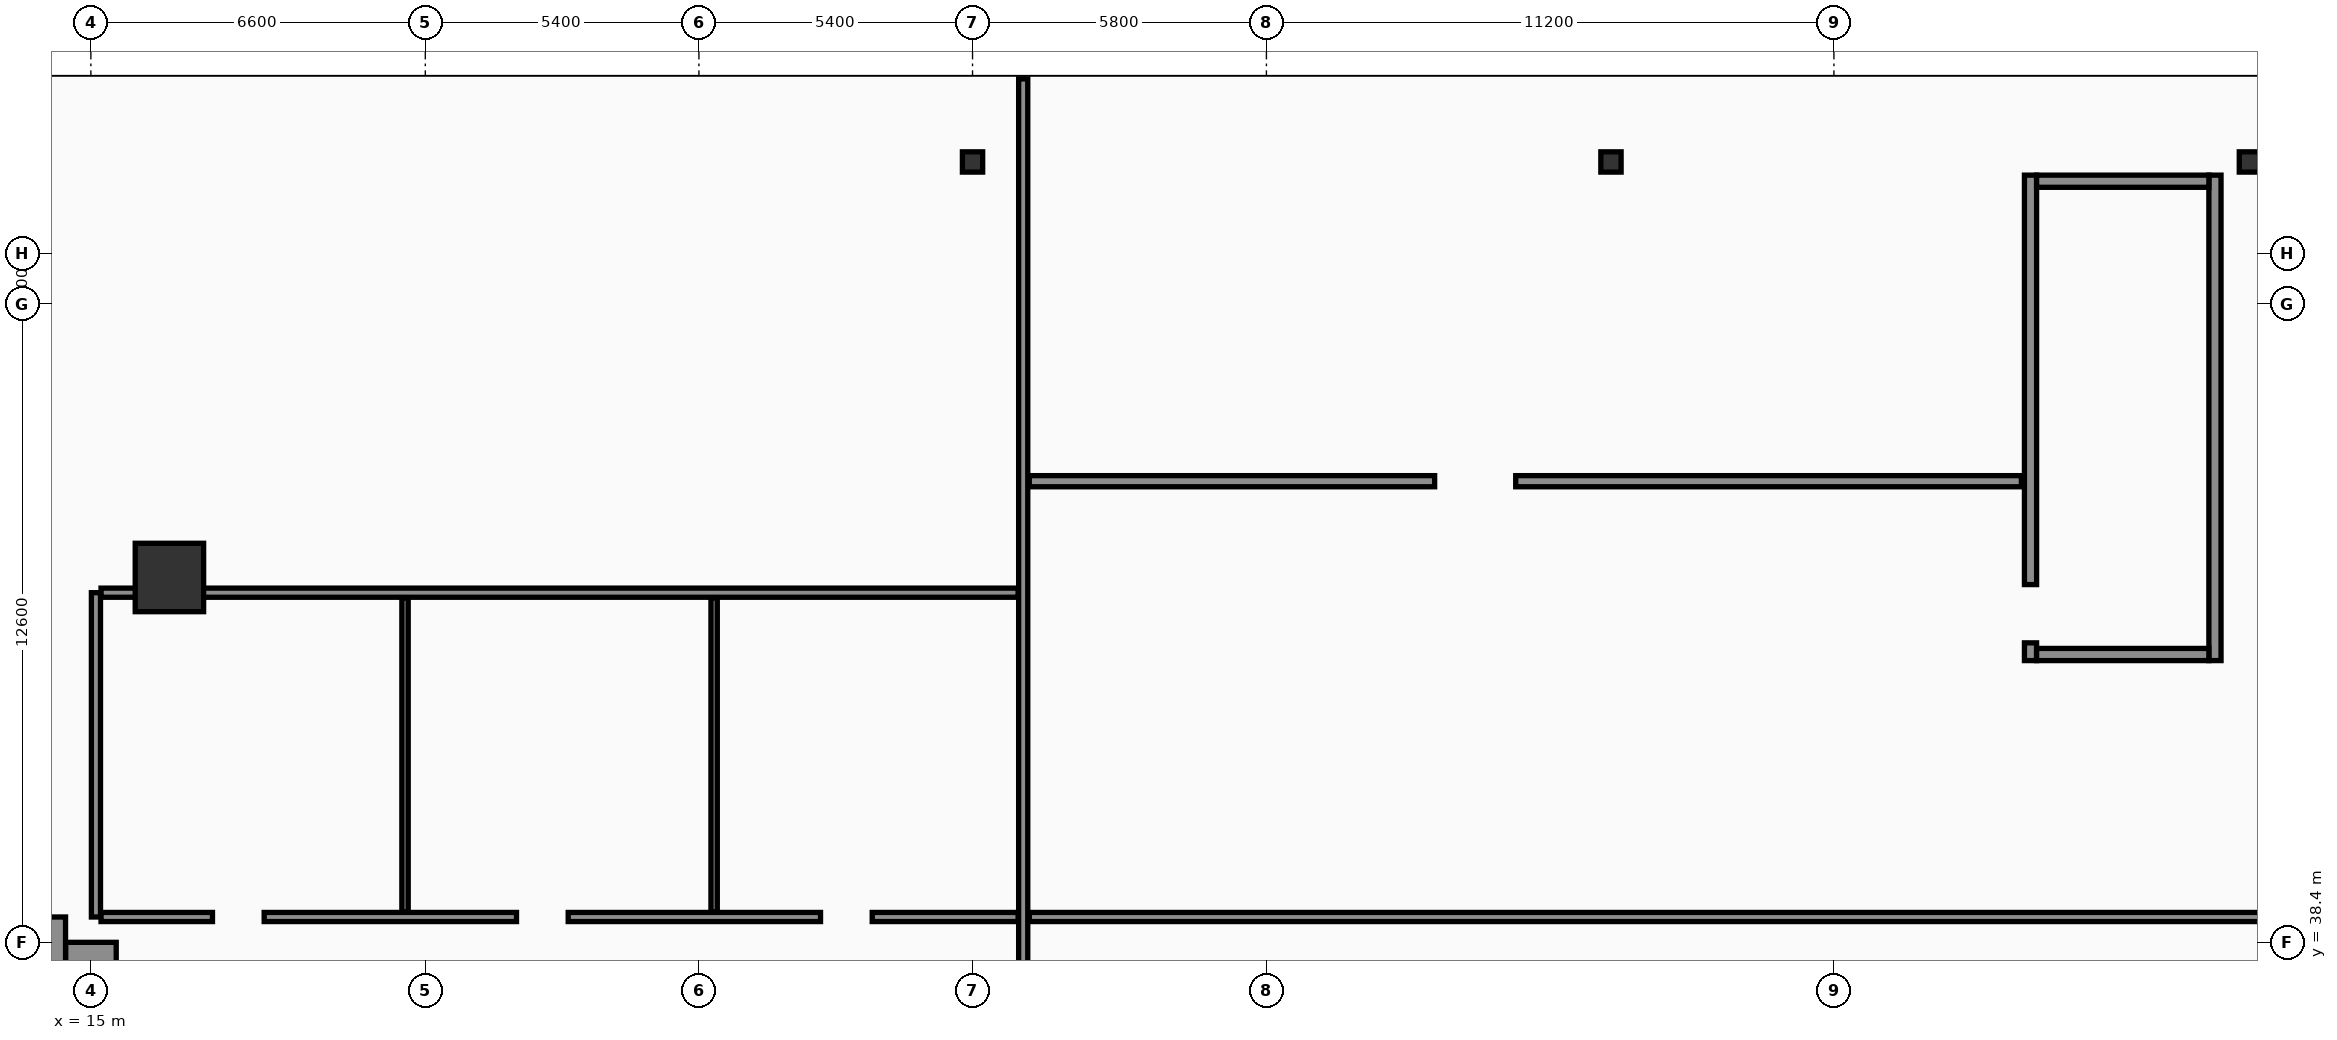
"""IFC4 building model, lengths in metres.
Left out: names, types, materials, properties, quantities, classifications, styles, units other than length and angle.
Written with IfcOpenShell. Run it as: python <this file> out.ifc"""

import sys

from ifc_helpers import new_model, si_unit, direction, frame, frame_2d, origin, origin_2d, place, context, subcontext, project, spatial, rectangle, i_section, extrude, element, fill, save


model = new_model("IFC4")
c1 = context("Model", 3, precision=1e-05, world=origin(), true_north=direction((0.0, 1.0)))
c2 = subcontext(c1, "Body", "Model", "MODEL_VIEW")
j1 = project(units=[si_unit("LENGTHUNIT", "METRE"), si_unit("PLANEANGLEUNIT", "RADIAN")], contexts=[c1])
p1 = place(None, origin())
s1 = spatial("IfcSite", under=j1, at=p1, CompositionType="ELEMENT")
p2 = place(p1, origin())
s2 = spatial("IfcBuilding", under=s1, at=p2, CompositionType="ELEMENT")
p3 = place(p2, frame((0.0, 0.0, 17.0)))
s3 = spatial("IfcBuildingStorey", under=s2, at=p3, CompositionType="ELEMENT", Elevation=17.0)
p4 = place(p3, frame((15.0, 16.8, 0.0), z_axis=(0.0, 0.0, 1.0), x_axis=(0.0, 1.0, 0.0)))
e1 = element("IfcWall", 1, at=p4, inside=s3, PredefinedType="SHEAR", context=c2, shape_type="SweptSolid", body=[
    extrude(rectangle(XDim=21.6, YDim=1.0, at=frame_2d((10.8, 0.0))), origin(), (0.0, 0.0, 1.0), 4.55),
])
p5 = place(p4, frame((8.65, 0.0, 0.0)))
e2 = element("IfcOpeningElement", 2, at=p5, cuts=e1, PredefinedType="OPENING", context=c2, shape_type="SweptSolid", body=[
    extrude(rectangle(XDim=1.1, YDim=2.2, at=frame_2d((0.55, 1.1))), frame((0.0, 0.51, 0.0), z_axis=(0.0, -1.0, 0.0), x_axis=(1.0, 0.0, 0.0)), (0.0, 0.0, 1.0), 1.02),
])
p6 = place(p4, frame((1.25, 0.0, 0.0)))
e3 = element("IfcOpeningElement", 3, at=p6, cuts=e1, PredefinedType="OPENING", context=c2, shape_type="SweptSolid", body=[
    extrude(rectangle(XDim=1.1, YDim=2.2, at=frame_2d((0.55, 1.1))), frame((0.0, 0.51, 0.0), z_axis=(0.0, -1.0, 0.0), x_axis=(1.0, 0.0, 0.0)), (0.0, 0.0, 1.0), 1.02),
])
p7 = place(p4, frame((3.8, 0.0, 0.0)))
e4 = element("IfcOpeningElement", 4, at=p7, cuts=e1, PredefinedType="OPENING", context=c2, shape_type="SweptSolid", body=[
    extrude(rectangle(XDim=1.1, YDim=2.2, at=frame_2d((0.55, 1.1))), frame((0.0, 0.51, 0.0), z_axis=(0.0, -1.0, 0.0), x_axis=(1.0, 0.0, 0.0)), (0.0, 0.0, 1.0), 1.02),
])
p8 = place(p4, frame((6.35, 0.0, 0.0)))
e5 = element("IfcOpeningElement", 5, at=p8, cuts=e1, PredefinedType="OPENING", context=c2, shape_type="SweptSolid", body=[
    extrude(rectangle(XDim=1.1, YDim=2.2, at=frame_2d((0.55, 1.1))), frame((0.0, 0.51, 0.0), z_axis=(0.0, -1.0, 0.0), x_axis=(1.0, 0.0, 0.0)), (0.0, 0.0, 1.0), 1.02),
])
p9 = place(p3, frame((4.7, 38.4, 0.0), z_axis=(0.0, 0.0, 1.0), x_axis=(1.0, 0.0, 0.0)))
e6 = element("IfcWall", 6, at=p9, inside=s3, PredefinedType="SHEAR", context=c2, shape_type="SweptSolid", body=[
    extrude(rectangle(XDim=9.8, YDim=1.0, at=frame_2d((4.9, 0.0))), origin(), (0.0, 0.0, 1.0), 4.55),
])
p10 = place(p3, frame((53.28, 43.96, 0.0), z_axis=(0.0, 0.0, 1.0), x_axis=(0.0, 1.0, 0.0)))
e7 = element("IfcWall", 7, at=p10, inside=s3, PredefinedType="SOLIDWALL", context=c2, shape_type="SweptSolid", body=[
    extrude(rectangle(XDim=9.58, YDim=0.24, at=frame_2d((4.79, 0.0))), origin(), (0.0, 0.0, 1.0), 4.55),
])
p11 = place(p10, frame((0.35, 0.0, 0.0)))
e8 = element("IfcOpeningElement", 8, at=p11, cuts=e7, PredefinedType="OPENING", context=c2, shape_type="SweptSolid", body=[
    extrude(rectangle(XDim=1.15, YDim=2.2, at=frame_2d((0.575, 1.1))), frame((0.0, 0.13, 0.0), z_axis=(0.0, -1.0, 0.0), x_axis=(1.0, 0.0, 0.0)), (0.0, 0.0, 1.0), 0.26),
])
p12 = place(p3, frame((56.92, 43.96, 0.0), z_axis=(0.0, 0.0, 1.0), x_axis=(0.0, 1.0, 0.0)))
e9 = element("IfcWall", 9, at=p12, inside=s3, PredefinedType="SOLIDWALL", context=c2, shape_type="SweptSolid", body=[
    extrude(rectangle(XDim=9.58, YDim=0.24, at=frame_2d((4.79, 0.0))), origin(), (0.0, 0.0, 1.0), 4.55),
])
for number, where, z_axis, x_axis in (
    (10, (53.4, 44.08, 0.0), (0.0, 0.0, 1.0), (1.0, 0.0, 0.0)),
    (11, (53.4, 53.42, 0.0), (0.0, 0.0, 1.0), (1.0, 0.0, 0.0)),
):
    element("IfcWall", number, at=place(p3, frame(where, z_axis=z_axis, x_axis=x_axis)), inside=s3, PredefinedType="SOLIDWALL", context=c2, shape_type="SweptSolid", body=[
        extrude(rectangle(XDim=3.4, YDim=0.24, at=frame_2d((1.7, 0.0))), origin(), (0.0, 0.0, 1.0), 4.55),
    ])
p13 = place(p3, frame((16.55, 45.6, 0.0), z_axis=(0.0, 0.0, 1.0), x_axis=(1.0, 0.0, 0.0)))
e12 = element("IfcColumn", 12, at=p13, inside=s3, PredefinedType="COLUMN", context=c2, shape_type="SweptSolid", body=[
    extrude(rectangle(XDim=1.35, YDim=1.35, at=origin_2d()), origin(), (0.0, 0.0, 1.0), 4.55),
])
for number, where, z_axis, x_axis in (
    (13, (32.4, 53.8, 0.0), (0.0, 0.0, 1.0), (1.0, 0.0, 0.0)),
    (14, (45.0, 53.8, 0.0), (0.0, 0.0, 1.0), (1.0, 0.0, 0.0)),
    (15, (57.6, 53.8, 0.0), (0.0, 0.0, 1.0), (1.0, 0.0, 0.0)),
):
    element("IfcColumn", number, at=place(p3, frame(where, z_axis=z_axis, x_axis=x_axis)), inside=s3, PredefinedType="PILASTER", context=c2, shape_type="SweptSolid", body=[
        extrude(i_section(OverallWidth=0.4, OverallDepth=0.4, WebThickness=0.013, FlangeThickness=0.021, FilletRadius=0.022, at=origin_2d()), origin(), (0.0, 0.0, 1.0), 4.55),
    ])
p14 = place(p3, frame((15.2, 38.9, 0.0), z_axis=(0.0, 0.0, 1.0), x_axis=(1.0, 0.0, 0.0)))
e16 = element("IfcWall", 16, at=p14, inside=s3, PredefinedType="PARTITIONING", context=c2, shape_type="SweptSolid", body=[
    extrude(rectangle(XDim=18.1, YDim=0.18, at=frame_2d((9.05, 0.0))), origin(), (0.0, 0.0, 1.0), 3.75),
])
p15 = place(p14, frame((2.2, 0.0, 0.0)))
e17 = element("IfcOpeningElement", 17, at=p15, cuts=e16, PredefinedType="OPENING", context=c2, shape_type="SweptSolid", body=[
    extrude(rectangle(XDim=1.02, YDim=2.2, at=frame_2d((0.51, 1.1))), frame((0.0, 0.1, 0.0), z_axis=(0.0, -1.0, 0.0), x_axis=(1.0, 0.0, 0.0)), (0.0, 0.0, 1.0), 0.2),
])
p16 = place(p14, frame((8.2, 0.0, 0.0)))
e18 = element("IfcOpeningElement", 18, at=p16, cuts=e16, PredefinedType="OPENING", context=c2, shape_type="SweptSolid", body=[
    extrude(rectangle(XDim=1.02, YDim=2.2, at=frame_2d((0.51, 1.1))), frame((0.0, 0.1, 0.0), z_axis=(0.0, -1.0, 0.0), x_axis=(1.0, 0.0, 0.0)), (0.0, 0.0, 1.0), 0.2),
])
p17 = place(p14, frame((14.2, 0.0, 0.0)))
e19 = element("IfcOpeningElement", 19, at=p17, cuts=e16, PredefinedType="OPENING", context=c2, shape_type="SweptSolid", body=[
    extrude(rectangle(XDim=1.02, YDim=2.2, at=frame_2d((0.51, 1.1))), frame((0.0, 0.1, 0.0), z_axis=(0.0, -1.0, 0.0), x_axis=(1.0, 0.0, 0.0)), (0.0, 0.0, 1.0), 0.2),
])
p18 = place(p3, frame((15.2, 45.3, 0.0), z_axis=(0.0, 0.0, 1.0), x_axis=(1.0, 0.0, 0.0)))
e20 = element("IfcWall", 20, at=p18, inside=s3, PredefinedType="PARTITIONING", context=c2, shape_type="SweptSolid", body=[
    extrude(rectangle(XDim=18.1, YDim=0.18, at=frame_2d((9.05, 0.0))), origin(), (0.0, 0.0, 1.0), 3.75),
])
p19 = place(p3, frame((15.1, 38.9, 0.0), z_axis=(0.0, 0.0, 1.0), x_axis=(0.0, 1.0, 0.0)))
e21 = element("IfcWall", 21, at=p19, inside=s3, PredefinedType="PARTITIONING", context=c2, shape_type="SweptSolid", body=[
    extrude(rectangle(XDim=6.4, YDim=0.18, at=frame_2d((3.2, 0.0))), origin(), (0.0, 0.0, 1.0), 3.75),
])
p20 = place(p3, frame((21.2, 39.0, 0.0), z_axis=(0.0, 0.0, 1.0), x_axis=(0.0, 1.0, 0.0)))
e22 = element("IfcWall", 22, at=p20, inside=s3, PredefinedType="PARTITIONING", context=c2, shape_type="SweptSolid", body=[
    extrude(rectangle(XDim=6.2, YDim=0.125, at=frame_2d((3.1, 0.0))), origin(), (0.0, 0.0, 1.0), 3.75),
])
p21 = place(p3, frame((27.3, 39.0, 0.0), z_axis=(0.0, 0.0, 1.0), x_axis=(0.0, 1.0, 0.0)))
e23 = element("IfcWall", 23, at=p21, inside=s3, PredefinedType="PARTITIONING", context=c2, shape_type="SweptSolid", body=[
    extrude(rectangle(XDim=6.2, YDim=0.125, at=frame_2d((3.1, 0.0))), origin(), (0.0, 0.0, 1.0), 4.55),
])
p22 = place(p3, frame((33.4, 0.06, 0.0), z_axis=(0.0, 0.0, 1.0), x_axis=(0.0, 1.0, 0.0)))
e24 = element("IfcWall", 24, at=p22, inside=s3, PredefinedType="PARTITIONING", context=c2, shape_type="SweptSolid", body=[
    extrude(rectangle(XDim=55.38, YDim=0.18, at=frame_2d((27.69, 0.0))), origin(), (0.0, 0.0, 1.0), 3.75),
])
p23 = place(p22, frame((18.5, 0.0, 0.0)))
e25 = element("IfcOpeningElement", 25, at=p23, cuts=e24, PredefinedType="OPENING", context=c2, shape_type="SweptSolid", body=[
    extrude(rectangle(XDim=1.8, YDim=2.4, at=frame_2d((0.9, 1.2))), frame((0.0, 0.1, 0.0), z_axis=(0.0, -1.0, 0.0), x_axis=(1.0, 0.0, 0.0)), (0.0, 0.0, 1.0), 0.2),
])
p24 = place(p22, frame((31.0, 0.0, 0.0)))
e26 = element("IfcOpeningElement", 26, at=p24, cuts=e24, PredefinedType="OPENING", context=c2, shape_type="SweptSolid", body=[
    extrude(rectangle(XDim=1.8, YDim=2.4, at=frame_2d((0.9, 1.2))), frame((0.0, 0.1, 0.0), z_axis=(0.0, -1.0, 0.0), x_axis=(1.0, 0.0, 0.0)), (0.0, 0.0, 1.0), 0.2),
])
p25 = place(p3, frame((33.52, 38.9, 0.0), z_axis=(0.0, 0.0, 1.0), x_axis=(1.0, 0.0, 0.0)))
e27 = element("IfcWall", 27, at=p25, inside=s3, PredefinedType="PARTITIONING", context=c2, shape_type="SweptSolid", body=[
    extrude(rectangle(XDim=42.16, YDim=0.18, at=frame_2d((21.08, 0.0))), origin(), (0.0, 0.0, 1.0), 3.75),
])
p26 = place(p3, frame((33.52, 47.5, 0.0), z_axis=(0.0, 0.0, 1.0), x_axis=(1.0, 0.0, 0.0)))
e28 = element("IfcWall", 28, at=p26, inside=s3, PredefinedType="SOLIDWALL", context=c2, shape_type="SweptSolid", body=[
    extrude(rectangle(XDim=19.58, YDim=0.22, at=frame_2d((9.79, 0.0))), origin(), (0.0, 0.0, 1.0), 3.75),
])
p27 = place(p26, frame((8.0, 0.0, 0.0)))
e29 = element("IfcOpeningElement", 29, at=p27, cuts=e28, PredefinedType="OPENING", context=c2, shape_type="SweptSolid", body=[
    extrude(rectangle(XDim=1.6, YDim=2.35, at=frame_2d((0.8, 1.175))), frame((0.0, 0.12, 0.0), z_axis=(0.0, -1.0, 0.0), x_axis=(1.0, 0.0, 0.0)), (0.0, 0.0, 1.0), 0.24),
])
p28 = place(p15, origin())
e30 = element("IfcDoor", 30, at=p28, inside=s3, OperationType="SINGLE_SWING_LEFT", PredefinedType="DOOR", context=c2, shape_type="SweptSolid", body=[
    extrude(rectangle(XDim=1.02, YDim=2.2, at=frame_2d((0.51, 1.1))), frame((0.0, 0.025, 0.0), z_axis=(0.0, -1.0, 0.0), x_axis=(1.0, 0.0, 0.0)), (0.0, 0.0, 1.0), 0.05),
])
fill(e17, e30)
p29 = place(p16, origin())
e31 = element("IfcDoor", 31, at=p29, inside=s3, OperationType="SINGLE_SWING_RIGHT", PredefinedType="DOOR", context=c2, shape_type="SweptSolid", body=[
    extrude(rectangle(XDim=1.02, YDim=2.2, at=frame_2d((0.51, 1.1))), frame((0.0, 0.025, 0.0), z_axis=(0.0, -1.0, 0.0), x_axis=(1.0, 0.0, 0.0)), (0.0, 0.0, 1.0), 0.05),
])
fill(e18, e31)
p30 = place(p17, origin())
e32 = element("IfcDoor", 32, at=p30, inside=s3, OperationType="SINGLE_SWING_LEFT", PredefinedType="DOOR", context=c2, shape_type="SweptSolid", body=[
    extrude(rectangle(XDim=1.02, YDim=2.2, at=frame_2d((0.51, 1.1))), frame((0.0, 0.025, 0.0), z_axis=(0.0, -1.0, 0.0), x_axis=(1.0, 0.0, 0.0)), (0.0, 0.0, 1.0), 0.05),
])
fill(e19, e32)
p31 = place(p27, origin())
e33 = element("IfcDoor", 33, at=p31, inside=s3, OperationType="SINGLE_SWING_LEFT", PredefinedType="DOOR", context=c2, shape_type="SweptSolid", body=[
    extrude(rectangle(XDim=1.6, YDim=2.35, at=frame_2d((0.8, 1.175))), frame((0.0, 0.025, 0.0), z_axis=(0.0, -1.0, 0.0), x_axis=(1.0, 0.0, 0.0)), (0.0, 0.0, 1.0), 0.05),
])
fill(e29, e33)
p32 = place(p11, origin())
e34 = element("IfcDoor", 34, at=p32, inside=s3, OperationType="SINGLE_SWING_LEFT", PredefinedType="DOOR", context=c2, shape_type="SweptSolid", body=[
    extrude(rectangle(XDim=1.15, YDim=2.2, at=frame_2d((0.575, 1.1))), frame((0.0, 0.025, 0.0), z_axis=(0.0, -1.0, 0.0), x_axis=(1.0, 0.0, 0.0)), (0.0, 0.0, 1.0), 0.05),
])
fill(e8, e34)
save(model, sys.argv[1])
